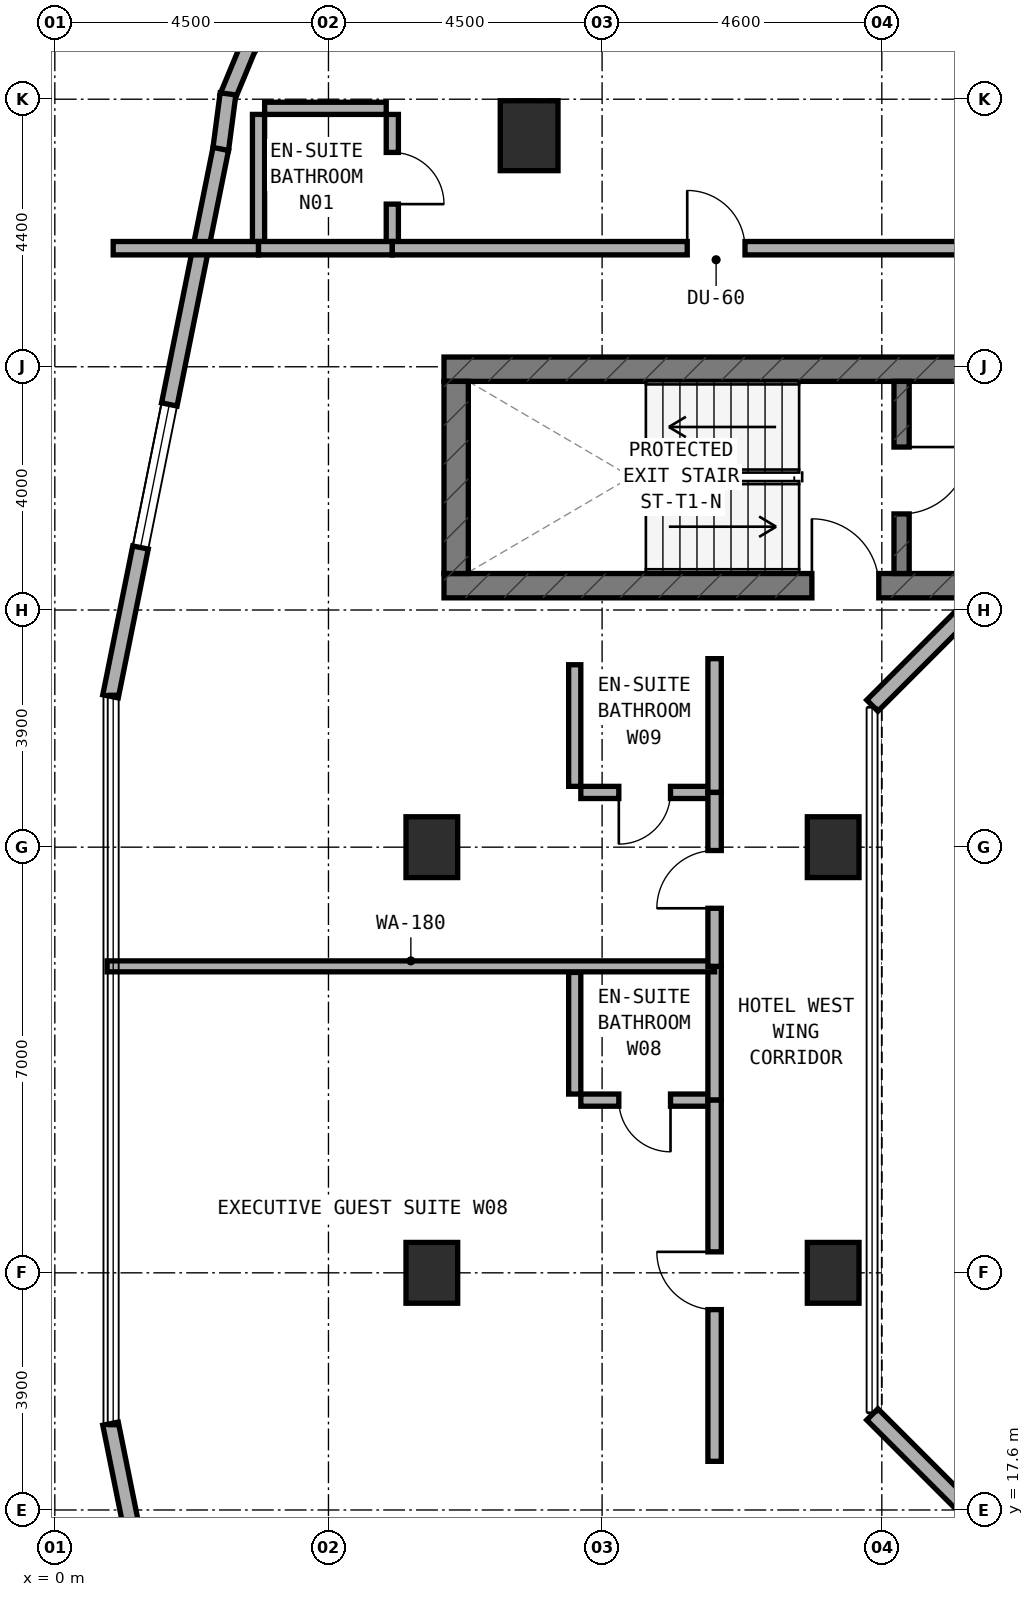
"""IFC4 building model, lengths in metres.
Left out: names, types, materials, properties, quantities, classifications, styles, units other than length and angle.
Written with IfcOpenShell. Run it as: python <this file> out.ifc"""

import sys

from ifc_helpers import new_model, si_unit, direction, frame, frame_2d, origin, origin_2d, place, context, subcontext, project, spatial, rectangle, extrude, element, fill, save


model = new_model("IFC4")
c1 = context("Model", 3, precision=1e-05, world=origin(), true_north=direction((0.0, 1.0)))
c2 = subcontext(c1, "Body", "Model", "MODEL_VIEW")
j1 = project(units=[si_unit("LENGTHUNIT", "METRE"), si_unit("PLANEANGLEUNIT", "RADIAN")], contexts=[c1])
p1 = place(None, origin())
s1 = spatial("IfcSite", under=j1, at=p1, CompositionType="ELEMENT")
p2 = place(p1, origin())
s2 = spatial("IfcBuilding", under=s1, at=p2, CompositionType="ELEMENT")
p3 = place(p2, frame((0.0, 0.0, 98.5)))
s3 = spatial("IfcBuildingStorey", under=s2, at=p3, CompositionType="ELEMENT", Elevation=98.5)
p4 = place(p3, frame((6.4, 32.8, 0.0), z_axis=(0.0, 0.0, 1.0), x_axis=(1.0, 0.0, 0.0)))
e1 = element("IfcWall", 1, at=p4, inside=s3, PredefinedType="SHEAR", context=c2, shape_type="SweptSolid", body=[
    extrude(rectangle(XDim=24.4, YDim=0.4, at=frame_2d((12.2, 0.0))), origin(), (0.0, 0.0, 1.0), 3.5),
])
p5 = place(p4, frame((6.05, 0.0, 0.0)))
e2 = element("IfcOpeningElement", 2, at=p5, cuts=e1, PredefinedType="OPENING", context=c2, shape_type="SweptSolid", body=[
    extrude(rectangle(XDim=1.1, YDim=2.15, at=frame_2d((0.55, 1.075))), frame((0.0, 0.21, 0.0), z_axis=(0.0, -1.0, 0.0), x_axis=(1.0, 0.0, 0.0)), (0.0, 0.0, 1.0), 0.42),
])
p6 = place(p3, frame((6.4, 36.36, 0.0), z_axis=(0.0, 0.0, 1.0), x_axis=(1.0, 0.0, 0.0)))
e3 = element("IfcWall", 3, at=p6, inside=s3, PredefinedType="SHEAR", context=c2, shape_type="SweptSolid", body=[
    extrude(rectangle(XDim=24.4, YDim=0.4, at=frame_2d((12.2, 0.0))), origin(), (0.0, 0.0, 1.0), 3.5),
])
p7 = place(p6, frame((9.15, 0.0, 0.0)))
e4 = element("IfcOpeningElement", 4, at=p7, cuts=e3, PredefinedType="OPENING", context=c2, shape_type="SweptSolid", body=[
    extrude(rectangle(XDim=1.2, YDim=2.15, at=frame_2d((0.6, 1.075))), frame((0.0, 0.21, 0.0), z_axis=(0.0, -1.0, 0.0), x_axis=(1.0, 0.0, 0.0)), (0.0, 0.0, 1.0), 0.42),
])
p8 = place(p6, frame((16.94, 0.0, 0.0)))
e5 = element("IfcOpeningElement", 5, at=p8, cuts=e3, PredefinedType="OPENING", context=c2, shape_type="SweptSolid", body=[
    extrude(rectangle(XDim=0.85, YDim=2.1, at=frame_2d((0.425, 1.05))), frame((0.0, 0.21, 0.0), z_axis=(0.0, -1.0, 0.0), x_axis=(1.0, 0.0, 0.0)), (0.0, 0.0, 1.0), 0.42),
])
p9 = place(p6, frame((18.783, 0.0, 0.0)))
e6 = element("IfcOpeningElement", 6, at=p9, cuts=e3, PredefinedType="OPENING", context=c2, shape_type="SweptSolid", body=[
    extrude(rectangle(XDim=1.1, YDim=2.15, at=frame_2d((0.55, 1.075))), frame((0.0, 0.21, 0.0), z_axis=(0.0, -1.0, 0.0), x_axis=(1.0, 0.0, 0.0)), (0.0, 0.0, 1.0), 0.42),
])
p10 = place(p6, frame((20.65, 0.0, 0.0)))
e7 = element("IfcOpeningElement", 7, at=p10, cuts=e3, PredefinedType="OPENING", context=c2, shape_type="SweptSolid", body=[
    extrude(rectangle(XDim=1.1, YDim=2.15, at=frame_2d((0.55, 1.075))), frame((0.0, 0.21, 0.0), z_axis=(0.0, -1.0, 0.0), x_axis=(1.0, 0.0, 0.0)), (0.0, 0.0, 1.0), 0.42),
])
p11 = place(p6, frame((22.517, 0.0, 0.0)))
e8 = element("IfcOpeningElement", 8, at=p11, cuts=e3, PredefinedType="OPENING", context=c2, shape_type="SweptSolid", body=[
    extrude(rectangle(XDim=1.1, YDim=2.15, at=frame_2d((0.55, 1.075))), frame((0.0, 0.21, 0.0), z_axis=(0.0, -1.0, 0.0), x_axis=(1.0, 0.0, 0.0)), (0.0, 0.0, 1.0), 0.42),
])
p12 = place(p3, frame((6.6, 33.0, 0.0), z_axis=(0.0, 0.0, 1.0), x_axis=(0.0, 1.0, 0.0)))
e9 = element("IfcWall", 9, at=p12, inside=s3, PredefinedType="SHEAR", context=c2, shape_type="SweptSolid", body=[
    extrude(rectangle(XDim=3.16, YDim=0.4, at=frame_2d((1.58, 0.0))), origin(), (0.0, 0.0, 1.0), 3.5),
])
p13 = place(p3, frame((13.925, 33.0, 0.0), z_axis=(0.0, 0.0, 1.0), x_axis=(0.0, 1.0, 0.0)))
e10 = element("IfcWall", 10, at=p13, inside=s3, PredefinedType="STANDARD", context=c2, shape_type="SweptSolid", body=[
    extrude(rectangle(XDim=3.16, YDim=0.25, at=frame_2d((1.58, 0.0))), origin(), (0.0, 0.0, 1.0), 3.22),
])
p14 = place(p13, frame((0.98, 0.0, 0.0)))
e11 = element("IfcOpeningElement", 11, at=p14, cuts=e10, PredefinedType="OPENING", context=c2, shape_type="SweptSolid", body=[
    extrude(rectangle(XDim=1.1, YDim=2.15, at=frame_2d((0.55, 1.075))), frame((0.0, 0.135, 0.0), z_axis=(0.0, -1.0, 0.0), x_axis=(1.0, 0.0, 0.0)), (0.0, 0.0, 1.0), 0.27),
])
for number, where, z_axis, x_axis in (
    (12, (6.2, 21.5, 0.0), (0.0, 0.0, 1.0), (1.0, 0.0, 0.0)),
    (13, (6.2, 28.5, 0.0), (0.0, 0.0, 1.0), (1.0, 0.0, 0.0)),
):
    element("IfcColumn", number, at=place(p3, frame(where, z_axis=z_axis, x_axis=x_axis)), inside=s3, PredefinedType="COLUMN", context=c2, shape_type="SweptSolid", body=[
        extrude(rectangle(XDim=0.85, YDim=1.0, at=origin_2d()), origin(), (0.0, 0.0, 1.0), 3.5),
    ])
p15 = place(p3, frame((7.8, 40.2, 0.0), z_axis=(0.0, 0.0, 1.0), x_axis=(1.0, 0.0, 0.0)))
e14 = element("IfcColumn", 14, at=p15, inside=s3, PredefinedType="COLUMN", context=c2, shape_type="SweptSolid", body=[
    extrude(rectangle(XDim=0.95, YDim=1.15, at=origin_2d()), origin(), (0.0, 0.0, 1.0), 3.5),
])
for number, where, z_axis, x_axis in (
    (15, (12.8, 21.5, 0.0), (0.0, 0.0, 1.0), (1.0, 0.0, 0.0)),
    (16, (12.8, 28.5, 0.0), (0.0, 0.0, 1.0), (1.0, 0.0, 0.0)),
):
    element("IfcColumn", number, at=place(p3, frame(where, z_axis=z_axis, x_axis=x_axis)), inside=s3, PredefinedType="COLUMN", context=c2, shape_type="SweptSolid", body=[
        extrude(rectangle(XDim=0.85, YDim=1.0, at=origin_2d()), origin(), (0.0, 0.0, 1.0), 3.5),
    ])
p16 = place(p3, frame((3.714, 42.345, 0.0), z_axis=(0.0, 0.0, 1.0), x_axis=(-0.608494022858, -0.793558456666, 0.0)))
e17 = element("IfcWall", 17, at=p16, inside=s3, PredefinedType="STANDARD", context=c2, shape_type="SweptSolid", body=[
    extrude(rectangle(XDim=0.902, YDim=0.26, at=frame_2d((0.451, 0.0))), origin(), (0.0, 0.0, 1.0), 3.22),
])
p17 = place(p3, frame((3.186, 41.673, 0.0), z_axis=(0.0, 0.0, 1.0), x_axis=(-0.383155708213, -0.923683767999, 0.0)))
e18 = element("IfcWall", 18, at=p17, inside=s3, PredefinedType="STANDARD", context=c2, shape_type="SweptSolid", body=[
    extrude(rectangle(XDim=0.903, YDim=0.26, at=frame_2d((0.451, 0.0))), origin(), (0.0, 0.0, 1.0), 3.22),
])
p18 = place(p3, frame((2.848, 40.888, 0.0), z_axis=(0.0, 0.0, 1.0), x_axis=(-0.130200706103, -0.991487658083, 0.0)))
e19 = element("IfcWall", 19, at=p18, inside=s3, PredefinedType="STANDARD", context=c2, shape_type="SweptSolid", body=[
    extrude(rectangle(XDim=0.921, YDim=0.26, at=frame_2d((0.46, 0.0))), origin(), (0.0, 0.0, 1.0), 3.22),
])
p19 = place(p3, frame((2.729, 39.982, 0.0), z_axis=(0.0, 0.0, 1.0), x_axis=(-0.197435082048, -0.980315963543, 0.0)))
e20 = element("IfcWall", 20, at=p19, inside=s3, PredefinedType="STANDARD", context=c2, shape_type="SweptSolid", body=[
    extrude(rectangle(XDim=9.183, YDim=0.26, at=frame_2d((4.591, 0.0))), origin(), (0.0, 0.0, 1.0), 3.22),
])
p20 = place(p19, frame((4.286, 0.0, 0.8)))
e21 = element("IfcOpeningElement", 21, at=p20, cuts=e20, PredefinedType="OPENING", context=c2, shape_type="SweptSolid", body=[
    extrude(rectangle(XDim=2.4, YDim=1.6, at=frame_2d((1.2, 0.8))), frame((0.0, 0.14, 0.0), z_axis=(0.0, -1.0, 0.0), x_axis=(1.0, 0.0, 0.0)), (0.0, 0.0, 1.0), 0.28),
])
p21 = place(p3, frame((0.916, 19.02, 0.0), z_axis=(0.0, 0.0, 1.0), x_axis=(0.197435082048, -0.980315963543, 0.0)))
e22 = element("IfcWall", 22, at=p21, inside=s3, PredefinedType="STANDARD", context=c2, shape_type="SweptSolid", body=[
    extrude(rectangle(XDim=9.183, YDim=0.26, at=frame_2d((4.591, 0.0))), origin(), (0.0, 0.0, 1.0), 3.22),
])
p22 = place(p21, frame((2.497, 0.0, 0.8)))
e23 = element("IfcOpeningElement", 23, at=p22, cuts=e22, PredefinedType="OPENING", context=c2, shape_type="SweptSolid", body=[
    extrude(rectangle(XDim=2.4, YDim=1.6, at=frame_2d((1.2, 0.8))), frame((0.0, 0.14, 0.0), z_axis=(0.0, -1.0, 0.0), x_axis=(1.0, 0.0, 0.0)), (0.0, 0.0, 1.0), 0.28),
])
for number, where, z_axis, x_axis in (
    (24, (15.278, 32.662, 0.0), (0.0, 0.0, 1.0), (-0.707, -0.707, 0.0)),
    (25, (13.444, 19.172, 0.0), (0.0, 0.0, 1.0), (0.707, -0.707, 0.0)),
):
    element("IfcWall", number, at=place(p3, frame(where, z_axis=z_axis, x_axis=x_axis)), inside=s3, PredefinedType="STANDARD", context=c2, shape_type="SweptSolid", body=[
        extrude(rectangle(XDim=2.594, YDim=0.26, at=frame_2d((1.297, 0.0))), origin(), (0.0, 0.0, 1.0), 3.22),
    ])
p23 = place(p3, frame((5.55, 38.45, 0.0), z_axis=(0.0, 0.0, 1.0), x_axis=(0.0, 1.0, 0.0)))
e26 = element("IfcWall", 26, at=p23, inside=s3, PredefinedType="PLUMBINGWALL", context=c2, shape_type="SweptSolid", body=[
    extrude(rectangle(XDim=2.1, YDim=0.2, at=frame_2d((1.05, 0.0))), origin(), (0.0, 0.0, 1.0), 3.22),
])
p24 = place(p23, frame((0.625, 0.0, 0.0)))
e27 = element("IfcOpeningElement", 27, at=p24, cuts=e26, PredefinedType="OPENING", context=c2, shape_type="SweptSolid", body=[
    extrude(rectangle(XDim=0.85, YDim=2.1, at=frame_2d((0.425, 1.05))), frame((0.0, 0.11, 0.0), z_axis=(0.0, -1.0, 0.0), x_axis=(1.0, 0.0, 0.0)), (0.0, 0.0, 1.0), 0.22),
])
p25 = place(p3, frame((3.45, 40.65, 0.0), z_axis=(0.0, 0.0, 1.0), x_axis=(1.0, 0.0, 0.0)))
e28 = element("IfcWall", 28, at=p25, inside=s3, PredefinedType="PLUMBINGWALL", context=c2, shape_type="SweptSolid", body=[
    extrude(rectangle(XDim=2.0, YDim=0.2, at=frame_2d((1.0, 0.0))), origin(), (0.0, 0.0, 1.0), 3.22),
])
p26 = place(p3, frame((3.35, 38.45, 0.0), z_axis=(0.0, 0.0, 1.0), x_axis=(0.0, 1.0, 0.0)))
e29 = element("IfcWall", 29, at=p26, inside=s3, PredefinedType="PLUMBINGWALL", context=c2, shape_type="SweptSolid", body=[
    extrude(rectangle(XDim=2.1, YDim=0.2, at=frame_2d((1.05, 0.0))), origin(), (0.0, 0.0, 1.0), 3.22),
])
p27 = place(p3, frame((0.96, 38.35, 0.0), z_axis=(0.0, 0.0, 1.0), x_axis=(1.0, 0.0, 0.0)))
e30 = element("IfcWall", 30, at=p27, inside=s3, PredefinedType="SOLIDWALL", context=c2, shape_type="SweptSolid", body=[
    extrude(rectangle(XDim=2.39, YDim=0.22, at=frame_2d((1.195, 0.0))), origin(), (0.0, 0.0, 1.0), 3.22),
])
p28 = place(p3, frame((3.35, 38.35, 0.0), z_axis=(0.0, 0.0, 1.0), x_axis=(1.0, 0.0, 0.0)))
e31 = element("IfcWall", 31, at=p28, inside=s3, PredefinedType="SOLIDWALL", context=c2, shape_type="SweptSolid", body=[
    extrude(rectangle(XDim=2.2, YDim=0.22, at=frame_2d((1.1, 0.0))), origin(), (0.0, 0.0, 1.0), 3.22),
])
p29 = place(p3, frame((5.55, 38.35, 0.0), z_axis=(0.0, 0.0, 1.0), x_axis=(1.0, 0.0, 0.0)))
e32 = element("IfcWall", 32, at=p29, inside=s3, PredefinedType="SOLIDWALL", context=c2, shape_type="SweptSolid", body=[
    extrude(rectangle(XDim=10.65, YDim=0.22, at=frame_2d((5.325, 0.0))), origin(), (0.0, 0.0, 1.0), 2.595),
])
p30 = place(p29, frame((4.85, 0.0, 0.0)))
e33 = element("IfcOpeningElement", 33, at=p30, cuts=e32, PredefinedType="OPENING", context=c2, shape_type="SweptSolid", body=[
    extrude(rectangle(XDim=0.95, YDim=2.1, at=frame_2d((0.475, 1.05))), frame((0.0, 0.12, 0.0), z_axis=(0.0, -1.0, 0.0), x_axis=(1.0, 0.0, 0.0)), (0.0, 0.0, 1.0), 0.24),
])
p31 = place(p3, frame((8.65, 24.34, 0.0), z_axis=(0.0, 0.0, 1.0), x_axis=(1.0, 0.0, 0.0)))
e34 = element("IfcWall", 34, at=p31, inside=s3, PredefinedType="PLUMBINGWALL", context=c2, shape_type="SweptSolid", body=[
    extrude(rectangle(XDim=2.1, YDim=0.2, at=frame_2d((1.05, 0.0))), origin(), (0.0, 0.0, 1.0), 3.22),
])
p32 = place(p31, frame((0.625, 0.0, 0.0)))
e35 = element("IfcOpeningElement", 35, at=p32, cuts=e34, PredefinedType="OPENING", context=c2, shape_type="SweptSolid", body=[
    extrude(rectangle(XDim=0.85, YDim=2.1, at=frame_2d((0.425, 1.05))), frame((0.0, 0.11, 0.0), z_axis=(0.0, -1.0, 0.0), x_axis=(1.0, 0.0, 0.0)), (0.0, 0.0, 1.0), 0.22),
])
p33 = place(p3, frame((8.55, 24.44, 0.0), z_axis=(0.0, 0.0, 1.0), x_axis=(0.0, 1.0, 0.0)))
e36 = element("IfcWall", 36, at=p33, inside=s3, PredefinedType="PLUMBINGWALL", context=c2, shape_type="SweptSolid", body=[
    extrude(rectangle(XDim=2.0, YDim=0.2, at=frame_2d((1.0, 0.0))), origin(), (0.0, 0.0, 1.0), 3.22),
])
p34 = place(p3, frame((10.85, 24.34, 0.0), z_axis=(0.0, 0.0, 1.0), x_axis=(0.0, 1.0, 0.0)))
e37 = element("IfcWall", 37, at=p34, inside=s3, PredefinedType="SOLIDWALL", context=c2, shape_type="SweptSolid", body=[
    extrude(rectangle(XDim=2.2, YDim=0.22, at=frame_2d((1.1, 0.0))), origin(), (0.0, 0.0, 1.0), 3.22),
])
p35 = place(p3, frame((10.85, 18.4, 0.0), z_axis=(0.0, 0.0, 1.0), x_axis=(0.0, 1.0, 0.0)))
e38 = element("IfcWall", 38, at=p35, inside=s3, PredefinedType="SOLIDWALL", context=c2, shape_type="SweptSolid", body=[
    extrude(rectangle(XDim=5.94, YDim=0.22, at=frame_2d((2.97, 0.0))), origin(), (0.0, 0.0, 1.0), 2.595),
])
p36 = place(p35, frame((2.495, 0.0, 0.0)))
e39 = element("IfcOpeningElement", 39, at=p36, cuts=e38, PredefinedType="OPENING", context=c2, shape_type="SweptSolid", body=[
    extrude(rectangle(XDim=0.95, YDim=2.1, at=frame_2d((0.475, 1.05))), frame((0.0, 0.12, 0.0), z_axis=(0.0, -1.0, 0.0), x_axis=(1.0, 0.0, 0.0)), (0.0, 0.0, 1.0), 0.24),
])
p37 = place(p3, frame((0.86, 26.54, 0.0), z_axis=(0.0, 0.0, 1.0), x_axis=(1.0, 0.0, 0.0)))
e40 = element("IfcWall", 40, at=p37, inside=s3, PredefinedType="SOLIDWALL", context=c2, shape_type="SweptSolid", body=[
    extrude(rectangle(XDim=9.99, YDim=0.18, at=frame_2d((4.995, 0.0))), origin(), (0.0, 0.0, 1.0), 2.835),
])
p38 = place(p3, frame((8.65, 29.4, 0.0), z_axis=(0.0, 0.0, 1.0), x_axis=(1.0, 0.0, 0.0)))
e41 = element("IfcWall", 41, at=p38, inside=s3, PredefinedType="PLUMBINGWALL", context=c2, shape_type="SweptSolid", body=[
    extrude(rectangle(XDim=2.1, YDim=0.2, at=frame_2d((1.05, 0.0))), origin(), (0.0, 0.0, 1.0), 3.22),
])
p39 = place(p38, frame((0.625, 0.0, 0.0)))
e42 = element("IfcOpeningElement", 42, at=p39, cuts=e41, PredefinedType="OPENING", context=c2, shape_type="SweptSolid", body=[
    extrude(rectangle(XDim=0.85, YDim=2.1, at=frame_2d((0.425, 1.05))), frame((0.0, 0.11, 0.0), z_axis=(0.0, -1.0, 0.0), x_axis=(1.0, 0.0, 0.0)), (0.0, 0.0, 1.0), 0.22),
])
p40 = place(p3, frame((8.55, 29.5, 0.0), z_axis=(0.0, 0.0, 1.0), x_axis=(0.0, 1.0, 0.0)))
e43 = element("IfcWall", 43, at=p40, inside=s3, PredefinedType="PLUMBINGWALL", context=c2, shape_type="SweptSolid", body=[
    extrude(rectangle(XDim=2.0, YDim=0.2, at=frame_2d((1.0, 0.0))), origin(), (0.0, 0.0, 1.0), 3.22),
])
p41 = place(p3, frame((10.85, 29.4, 0.0), z_axis=(0.0, 0.0, 1.0), x_axis=(0.0, 1.0, 0.0)))
e44 = element("IfcWall", 44, at=p41, inside=s3, PredefinedType="SOLIDWALL", context=c2, shape_type="SweptSolid", body=[
    extrude(rectangle(XDim=2.2, YDim=0.22, at=frame_2d((1.1, 0.0))), origin(), (0.0, 0.0, 1.0), 3.22),
])
p42 = place(p3, frame((10.85, 26.54, 0.0), z_axis=(0.0, 0.0, 1.0), x_axis=(0.0, 1.0, 0.0)))
e45 = element("IfcWall", 45, at=p42, inside=s3, PredefinedType="SOLIDWALL", context=c2, shape_type="SweptSolid", body=[
    extrude(rectangle(XDim=2.86, YDim=0.22, at=frame_2d((1.43, 0.0))), origin(), (0.0, 0.0, 1.0), 2.595),
])
p43 = place(p42, frame((0.955, 0.0, 0.0)))
e46 = element("IfcOpeningElement", 46, at=p43, cuts=e45, PredefinedType="OPENING", context=c2, shape_type="SweptSolid", body=[
    extrude(rectangle(XDim=0.95, YDim=2.1, at=frame_2d((0.475, 1.05))), frame((0.0, 0.12, 0.0), z_axis=(0.0, -1.0, 0.0), x_axis=(1.0, 0.0, 0.0)), (0.0, 0.0, 1.0), 0.24),
])
p44 = place(p20, origin())
e47 = element("IfcWindow", 47, at=p44, inside=s3, PartitioningType="SINGLE_PANEL", PredefinedType="WINDOW", context=c2, shape_type="SweptSolid", body=[
    extrude(rectangle(XDim=2.4, YDim=1.6, at=frame_2d((1.2, 0.8))), frame((0.0, 0.03, 0.0), z_axis=(0.0, -1.0, 0.0), x_axis=(1.0, 0.0, 0.0)), (0.0, 0.0, 1.0), 0.06),
])
fill(e21, e47)
p45 = place(p14, frame((1.1, 0.0, 0.0), z_axis=(0.0, 0.0, 1.0), x_axis=(-1.0, 0.0, 0.0)))
e48 = element("IfcDoor", 48, at=p45, inside=s3, OperationType="SINGLE_SWING_LEFT", PredefinedType="DOOR", context=c2, shape_type="SweptSolid", body=[
    extrude(rectangle(XDim=1.1, YDim=2.15, at=frame_2d((0.55, 1.075))), frame((0.0, 0.025, 0.0), z_axis=(0.0, -1.0, 0.0), x_axis=(1.0, 0.0, 0.0)), (0.0, 0.0, 1.0), 0.05),
])
fill(e11, e48)
p46 = place(p5, origin())
e49 = element("IfcDoor", 49, at=p46, inside=s3, OperationType="SINGLE_SWING_LEFT", PredefinedType="DOOR", context=c2, shape_type="SweptSolid", body=[
    extrude(rectangle(XDim=1.1, YDim=2.15, at=frame_2d((0.55, 1.075))), frame((0.0, 0.025, 0.0), z_axis=(0.0, -1.0, 0.0), x_axis=(1.0, 0.0, 0.0)), (0.0, 0.0, 1.0), 0.05),
])
fill(e2, e49)
p47 = place(p24, frame((0.85, 0.0, 0.0), z_axis=(0.0, 0.0, 1.0), x_axis=(-1.0, 0.0, 0.0)))
e50 = element("IfcDoor", 50, at=p47, inside=s3, OperationType="SINGLE_SWING_RIGHT", PredefinedType="DOOR", context=c2, shape_type="SweptSolid", body=[
    extrude(rectangle(XDim=0.85, YDim=2.1, at=frame_2d((0.425, 1.05))), frame((0.0, 0.025, 0.0), z_axis=(0.0, -1.0, 0.0), x_axis=(1.0, 0.0, 0.0)), (0.0, 0.0, 1.0), 0.05),
])
fill(e27, e50)
p48 = place(p30, origin())
e51 = element("IfcDoor", 51, at=p48, inside=s3, OperationType="SINGLE_SWING_LEFT", PredefinedType="DOOR", context=c2, shape_type="SweptSolid", body=[
    extrude(rectangle(XDim=0.95, YDim=2.1, at=frame_2d((0.475, 1.05))), frame((0.0, 0.025, 0.0), z_axis=(0.0, -1.0, 0.0), x_axis=(1.0, 0.0, 0.0)), (0.0, 0.0, 1.0), 0.05),
])
fill(e33, e51)
p49 = place(p32, frame((0.85, 0.0, 0.0), z_axis=(0.0, 0.0, 1.0), x_axis=(-1.0, 0.0, 0.0)))
e52 = element("IfcDoor", 52, at=p49, inside=s3, OperationType="SINGLE_SWING_LEFT", PredefinedType="DOOR", context=c2, shape_type="SweptSolid", body=[
    extrude(rectangle(XDim=0.85, YDim=2.1, at=frame_2d((0.425, 1.05))), frame((0.0, 0.025, 0.0), z_axis=(0.0, -1.0, 0.0), x_axis=(1.0, 0.0, 0.0)), (0.0, 0.0, 1.0), 0.05),
])
fill(e35, e52)
p50 = place(p36, origin())
e53 = element("IfcDoor", 53, at=p50, inside=s3, OperationType="SINGLE_SWING_RIGHT", PredefinedType="DOOR", context=c2, shape_type="SweptSolid", body=[
    extrude(rectangle(XDim=0.95, YDim=2.1, at=frame_2d((0.475, 1.05))), frame((0.0, 0.025, 0.0), z_axis=(0.0, -1.0, 0.0), x_axis=(1.0, 0.0, 0.0)), (0.0, 0.0, 1.0), 0.05),
])
fill(e39, e53)
p51 = place(p39, frame((0.85, 0.0, 0.0), z_axis=(0.0, 0.0, 1.0), x_axis=(-1.0, 0.0, 0.0)))
e54 = element("IfcDoor", 54, at=p51, inside=s3, OperationType="SINGLE_SWING_RIGHT", PredefinedType="DOOR", context=c2, shape_type="SweptSolid", body=[
    extrude(rectangle(XDim=0.85, YDim=2.1, at=frame_2d((0.425, 1.05))), frame((0.0, 0.025, 0.0), z_axis=(0.0, -1.0, 0.0), x_axis=(1.0, 0.0, 0.0)), (0.0, 0.0, 1.0), 0.05),
])
fill(e42, e54)
p52 = place(p43, origin())
e55 = element("IfcDoor", 55, at=p52, inside=s3, OperationType="SINGLE_SWING_LEFT", PredefinedType="DOOR", context=c2, shape_type="SweptSolid", body=[
    extrude(rectangle(XDim=0.95, YDim=2.1, at=frame_2d((0.475, 1.05))), frame((0.0, 0.025, 0.0), z_axis=(0.0, -1.0, 0.0), x_axis=(1.0, 0.0, 0.0)), (0.0, 0.0, 1.0), 0.05),
])
fill(e46, e55)
save(model, sys.argv[1])
